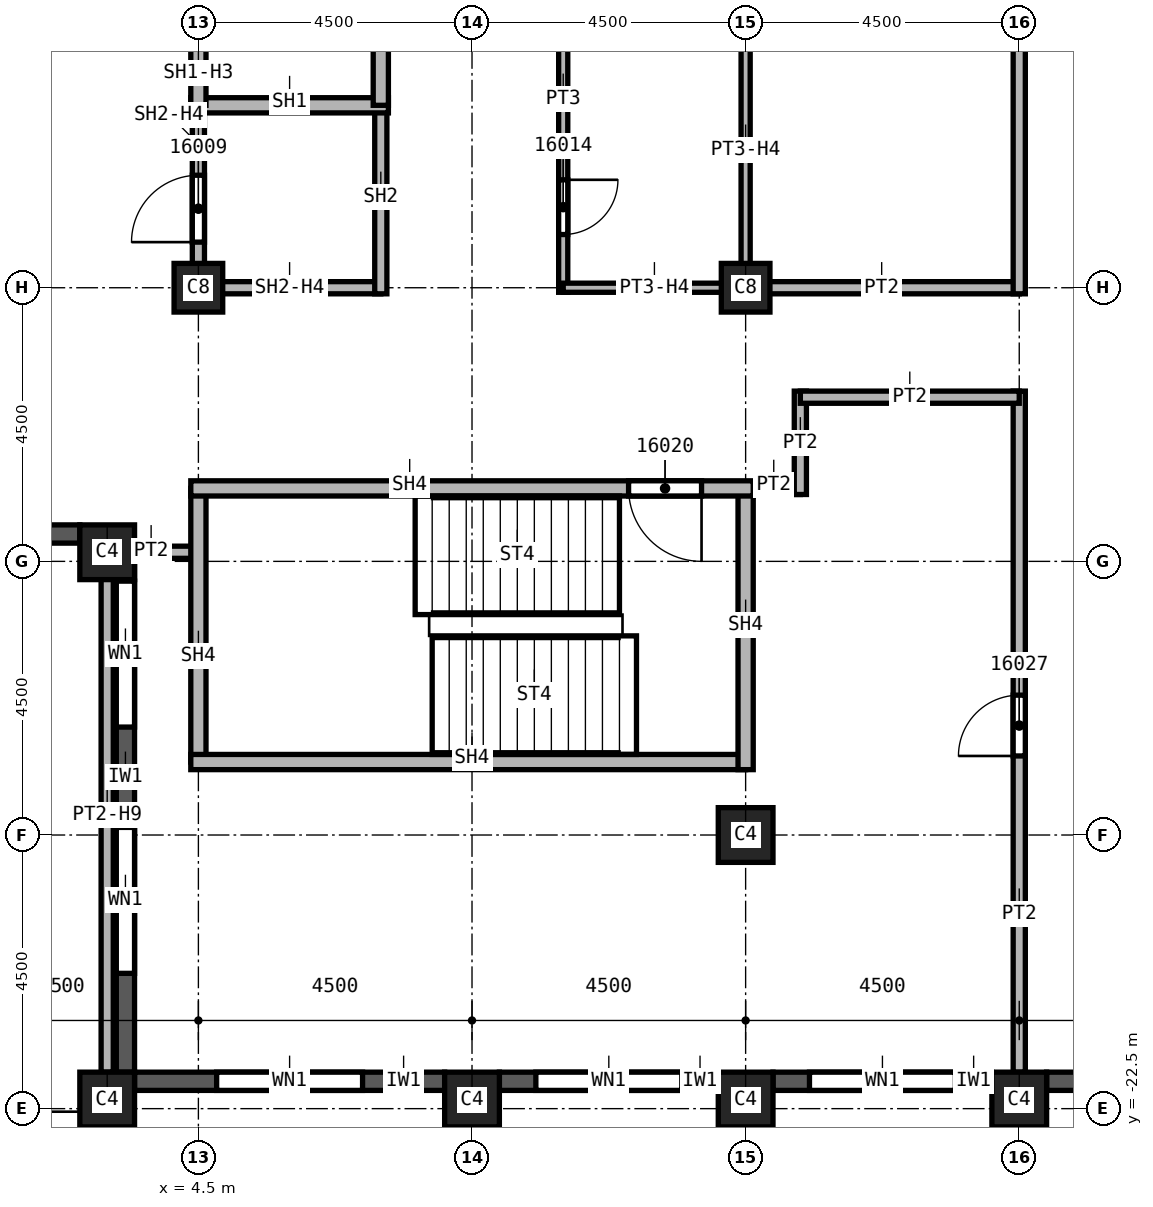
"""IFC4 building model, lengths in metres.
Left out: names, types, materials, properties, quantities, classifications, styles, units other than length and angle.
Written with IfcOpenShell. Run it as: python <this file> out.ifc"""

import sys

from ifc_helpers import new_model, si_unit, direction, frame, frame_2d, origin, origin_2d, place, context, subcontext, project, spatial, rectangle, extrude, element, fill, save


model = new_model("IFC4")
c1 = context("Model", 3, precision=1e-05, world=origin(), true_north=direction((0.0, 1.0)))
c2 = subcontext(c1, "Body", "Model", "MODEL_VIEW")
j1 = project(units=[si_unit("LENGTHUNIT", "METRE"), si_unit("PLANEANGLEUNIT", "RADIAN")], contexts=[c1])
p1 = place(None, origin())
s1 = spatial("IfcSite", under=j1, at=p1, CompositionType="ELEMENT")
p2 = place(p1, origin())
s2 = spatial("IfcBuilding", under=s1, at=p2, CompositionType="ELEMENT")
p3 = place(p2, frame((0.0, 0.0, 242.0)))
s3 = spatial("IfcBuildingStorey", under=s2, at=p3, CompositionType="ELEMENT", Elevation=242.0)
p4 = place(p3, frame((13.5, -18.0, 0.0), z_axis=(0.0, 0.0, 1.0), x_axis=(1.0, 0.0, 0.0)))
e1 = element("IfcColumn", 1, at=p4, inside=s3, PredefinedType="COLUMN", context=c2, shape_type="SweptSolid", body=[
    extrude(rectangle(XDim=0.9, YDim=0.9, at=origin_2d()), origin(), (0.0, 0.0, 1.0), 3.72),
])
for number, where, z_axis, x_axis in (
    (2, (4.5, -9.0, 0.0), (0.0, 0.0, 1.0), (1.0, 0.0, 0.0)),
    (3, (13.5, -9.0, 0.0), (0.0, 0.0, 1.0), (1.0, 0.0, 0.0)),
):
    element("IfcColumn", number, at=place(p3, frame(where, z_axis=z_axis, x_axis=x_axis)), inside=s3, PredefinedType="COLUMN", context=c2, shape_type="SweptSolid", body=[
        extrude(rectangle(XDim=0.8, YDim=0.8, at=origin_2d()), origin(), (0.0, 0.0, 1.0), 3.72),
    ])
for number, where, z_axis, x_axis in (
    (4, (3.0, -22.35, 0.0), (0.0, 0.0, 1.0), (1.0, 0.0, 0.0)),
    (5, (9.0, -22.35, 0.0), (0.0, 0.0, 1.0), (1.0, 0.0, 0.0)),
    (6, (13.5, -22.35, 0.0), (0.0, 0.0, 1.0), (1.0, 0.0, 0.0)),
    (7, (18.0, -22.35, 0.0), (0.0, 0.0, 1.0), (1.0, 0.0, 0.0)),
    (8, (3.0, -13.35, 0.0), (0.0, 0.0, 1.0), (1.0, 0.0, 0.0)),
):
    element("IfcColumn", number, at=place(p3, frame(where, z_axis=z_axis, x_axis=x_axis)), inside=s3, PredefinedType="COLUMN", context=c2, shape_type="SweptSolid", body=[
        extrude(rectangle(XDim=0.9, YDim=0.9, at=origin_2d()), origin(), (0.0, 0.0, 1.0), 3.72),
    ])
p5 = place(p3, frame((2.55, -13.05, 0.0), z_axis=(0.0, 0.0, 1.0), x_axis=(-1.0, 0.0, 0.0)))
e9 = element("IfcWall", 9, at=p5, inside=s3, PredefinedType="SOLIDWALL", context=c2, shape_type="SweptSolid", body=[
    extrude(rectangle(XDim=5.1, YDim=0.3, at=frame_2d((2.55, 0.0))), origin(), (0.0, 0.0, 1.0), 3.12),
])
p6 = place(p5, frame((1.95, 0.0, 0.0)))
e10 = element("IfcOpeningElement", 10, at=p6, cuts=e9, PredefinedType="OPENING", context=c2, shape_type="SweptSolid", body=[
    extrude(rectangle(XDim=1.2, YDim=2.4, at=frame_2d((0.6, 1.2))), frame((0.0, 0.15, 0.0), z_axis=(0.0, -1.0, 0.0), x_axis=(1.0, 0.0, 0.0)), (0.0, 0.0, 1.0), 0.3),
])
p7 = place(p3, frame((3.3, -13.4, 0.0), z_axis=(0.0, 0.0, 1.0), x_axis=(0.0, -1.0, 0.0)))
e11 = element("IfcWall", 11, at=p7, inside=s3, PredefinedType="SOLIDWALL", context=c2, shape_type="SweptSolid", body=[
    extrude(rectangle(XDim=8.5, YDim=0.3, at=frame_2d((4.25, 0.0))), origin(), (0.0, 0.0, 1.0), 3.12),
])
p8 = place(p7, frame((0.425, 0.0, 0.8)))
e12 = element("IfcOpeningElement", 12, at=p8, cuts=e11, PredefinedType="OPENING", context=c2, shape_type="SweptSolid", body=[
    extrude(rectangle(XDim=2.4, YDim=1.95, at=frame_2d((1.2, 0.975))), frame((0.0, 0.15, 0.0), z_axis=(0.0, -1.0, 0.0), x_axis=(1.0, 0.0, 0.0)), (0.0, 0.0, 1.0), 0.3),
])
p9 = place(p7, frame((4.475, 0.0, 0.8)))
e13 = element("IfcOpeningElement", 13, at=p9, cuts=e11, PredefinedType="OPENING", context=c2, shape_type="SweptSolid", body=[
    extrude(rectangle(XDim=2.4, YDim=1.95, at=frame_2d((1.2, 0.975))), frame((0.0, 0.15, 0.0), z_axis=(0.0, -1.0, 0.0), x_axis=(1.0, 0.0, 0.0)), (0.0, 0.0, 1.0), 0.3),
])
p10 = place(p3, frame((3.45, -22.05, 0.0), z_axis=(0.0, 0.0, 1.0), x_axis=(1.0, 0.0, 0.0)))
e14 = element("IfcWall", 14, at=p10, inside=s3, PredefinedType="SOLIDWALL", context=c2, shape_type="SweptSolid", body=[
    extrude(rectangle(XDim=5.1, YDim=0.3, at=frame_2d((2.55, 0.0))), origin(), (0.0, 0.0, 1.0), 3.12),
])
p11 = place(p10, frame((1.35, 0.0, 0.8)))
e15 = element("IfcOpeningElement", 15, at=p11, cuts=e14, PredefinedType="OPENING", context=c2, shape_type="SweptSolid", body=[
    extrude(rectangle(XDim=2.4, YDim=1.95, at=frame_2d((1.2, 0.975))), frame((0.0, 0.15, 0.0), z_axis=(0.0, -1.0, 0.0), x_axis=(1.0, 0.0, 0.0)), (0.0, 0.0, 1.0), 0.3),
])
p12 = place(p3, frame((9.45, -22.05, 0.0), z_axis=(0.0, 0.0, 1.0), x_axis=(1.0, 0.0, 0.0)))
e16 = element("IfcWall", 16, at=p12, inside=s3, PredefinedType="SOLIDWALL", context=c2, shape_type="SweptSolid", body=[
    extrude(rectangle(XDim=3.6, YDim=0.3, at=frame_2d((1.8, 0.0))), origin(), (0.0, 0.0, 1.0), 3.12),
])
p13 = place(p12, frame((0.6, 0.0, 0.8)))
e17 = element("IfcOpeningElement", 17, at=p13, cuts=e16, PredefinedType="OPENING", context=c2, shape_type="SweptSolid", body=[
    extrude(rectangle(XDim=2.4, YDim=1.95, at=frame_2d((1.2, 0.975))), frame((0.0, 0.15, 0.0), z_axis=(0.0, -1.0, 0.0), x_axis=(1.0, 0.0, 0.0)), (0.0, 0.0, 1.0), 0.3),
])
p14 = place(p3, frame((13.95, -22.05, 0.0), z_axis=(0.0, 0.0, 1.0), x_axis=(1.0, 0.0, 0.0)))
e18 = element("IfcWall", 18, at=p14, inside=s3, PredefinedType="SOLIDWALL", context=c2, shape_type="SweptSolid", body=[
    extrude(rectangle(XDim=3.6, YDim=0.3, at=frame_2d((1.8, 0.0))), origin(), (0.0, 0.0, 1.0), 3.12),
])
p15 = place(p14, frame((0.6, 0.0, 0.8)))
e19 = element("IfcOpeningElement", 19, at=p15, cuts=e18, PredefinedType="OPENING", context=c2, shape_type="SweptSolid", body=[
    extrude(rectangle(XDim=2.4, YDim=1.95, at=frame_2d((1.2, 0.975))), frame((0.0, 0.15, 0.0), z_axis=(0.0, -1.0, 0.0), x_axis=(1.0, 0.0, 0.0)), (0.0, 0.0, 1.0), 0.3),
])
p16 = place(p3, frame((18.45, -22.05, 0.0), z_axis=(0.0, 0.0, 1.0), x_axis=(1.0, 0.0, 0.0)))
e20 = element("IfcWall", 20, at=p16, inside=s3, PredefinedType="SOLIDWALL", context=c2, shape_type="SweptSolid", body=[
    extrude(rectangle(XDim=3.6, YDim=0.3, at=frame_2d((1.8, 0.0))), origin(), (0.0, 0.0, 1.0), 3.12),
])
p17 = place(p16, frame((0.625, 0.0, 0.8)))
e21 = element("IfcOpeningElement", 21, at=p17, cuts=e20, PredefinedType="OPENING", context=c2, shape_type="SweptSolid", body=[
    extrude(rectangle(XDim=0.6, YDim=1.95, at=frame_2d((0.3, 0.975))), frame((0.0, 0.15, 0.0), z_axis=(0.0, -1.0, 0.0), x_axis=(1.0, 0.0, 0.0)), (0.0, 0.0, 1.0), 0.3),
])
p18 = place(p16, frame((1.825, 0.0, 0.8)))
e22 = element("IfcOpeningElement", 22, at=p18, cuts=e20, PredefinedType="OPENING", context=c2, shape_type="SweptSolid", body=[
    extrude(rectangle(XDim=1.0, YDim=1.95, at=frame_2d((0.5, 0.975))), frame((0.0, 0.15, 0.0), z_axis=(0.0, -1.0, 0.0), x_axis=(1.0, 0.0, 0.0)), (0.0, 0.0, 1.0), 0.3),
])
p19 = place(p3, frame((3.0, -13.42, 0.0), z_axis=(0.0, 0.0, 1.0), x_axis=(0.0, -1.0, 0.0)))
e23 = element("IfcWall", 23, at=p19, inside=s3, PredefinedType="PARTITIONING", context=c2, shape_type="SweptSolid", body=[
    extrude(rectangle(XDim=8.479, YDim=0.2, at=frame_2d((4.24, 0.0))), origin(), (0.0, 0.0, 1.0), 2.874),
])
p20 = place(p3, frame((4.5, -13.35, 0.0), z_axis=(0.0, 0.0, 1.0), x_axis=(-1.0, 0.0, 0.0)))
e24 = element("IfcWall", 24, at=p20, inside=s3, PredefinedType="PARTITIONING", context=c2, shape_type="SweptSolid", body=[
    extrude(rectangle(XDim=1.429, YDim=0.2, at=frame_2d((0.715, 0.0))), origin(), (0.0, 0.0, 1.0), 3.72),
])
p21 = place(p3, frame((13.5, -9.0, 0.0), z_axis=(0.0, 0.0, 1.0), x_axis=(1.0, 0.0, 0.0)))
e25 = element("IfcWall", 25, at=p21, inside=s3, PredefinedType="PARTITIONING", context=c2, shape_type="SweptSolid", body=[
    extrude(rectangle(XDim=4.5, YDim=0.2, at=frame_2d((2.25, 0.0))), origin(), (0.0, 0.0, 1.0), 3.72),
])
p22 = place(p3, frame((14.4, -12.3, 0.0), z_axis=(0.0, 0.0, 1.0), x_axis=(-1.0, 0.0, 0.0)))
e26 = element("IfcWall", 26, at=p22, inside=s3, PredefinedType="PARTITIONING", context=c2, shape_type="SweptSolid", body=[
    extrude(rectangle(XDim=1.025, YDim=0.2, at=frame_2d((0.512, 0.0))), origin(), (0.0, 0.0, 1.0), 3.72),
])
p23 = place(p3, frame((14.4, -10.7, 0.0), z_axis=(0.0, 0.0, 1.0), x_axis=(0.0, -1.0, 0.0)))
e27 = element("IfcWall", 27, at=p23, inside=s3, PredefinedType="PARTITIONING", context=c2, shape_type="SweptSolid", body=[
    extrude(rectangle(XDim=1.7, YDim=0.2, at=frame_2d((0.85, 0.0))), origin(), (0.0, 0.0, 1.0), 3.72),
])
p24 = place(p3, frame((18.0, -21.9, 0.0), z_axis=(0.0, 0.0, 1.0), x_axis=(0.0, 1.0, 0.0)))
e28 = element("IfcWall", 28, at=p24, inside=s3, PredefinedType="PARTITIONING", context=c2, shape_type="SweptSolid", body=[
    extrude(rectangle(XDim=11.2, YDim=0.2, at=frame_2d((5.6, 0.0))), origin(), (0.0, 0.0, 1.0), 3.72),
])
p25 = place(p24, frame((5.2, 0.0, 0.0)))
e29 = element("IfcOpeningElement", 29, at=p25, cuts=e28, PredefinedType="OPENING", context=c2, shape_type="SweptSolid", body=[
    extrude(rectangle(XDim=1.0, YDim=2.1, at=frame_2d((0.5, 1.05))), frame((0.0, 0.1, 0.0), z_axis=(0.0, -1.0, 0.0), x_axis=(1.0, 0.0, 0.0)), (0.0, 0.0, 1.0), 0.2),
])
p26 = place(p3, frame((18.0, -10.8, 0.0), z_axis=(0.0, 0.0, 1.0), x_axis=(-1.0, 0.0, 0.0)))
e30 = element("IfcWall", 30, at=p26, inside=s3, PredefinedType="PARTITIONING", context=c2, shape_type="SweptSolid", body=[
    extrude(rectangle(XDim=3.6, YDim=0.2, at=frame_2d((1.8, 0.0))), origin(), (0.0, 0.0, 1.0), 3.72),
])
p27 = place(p3, frame((18.0, -9.1, 0.0), z_axis=(0.0, 0.0, 1.0), x_axis=(0.0, 1.0, 0.0)))
e31 = element("IfcWall", 31, at=p27, inside=s3, PredefinedType="PARTITIONING", context=c2, shape_type="SweptSolid", body=[
    extrude(rectangle(XDim=18.2, YDim=0.2, at=frame_2d((9.1, 0.0))), origin(), (0.0, 0.0, 1.0), 3.72),
])
p28 = place(p27, frame((4.6, 0.0, 0.0)))
e32 = element("IfcOpeningElement", 32, at=p28, cuts=e31, PredefinedType="OPENING", context=c2, shape_type="SweptSolid", body=[
    extrude(rectangle(XDim=1.0, YDim=2.1, at=frame_2d((0.5, 1.05))), frame((0.0, 0.1, 0.0), z_axis=(0.0, -1.0, 0.0), x_axis=(1.0, 0.0, 0.0)), (0.0, 0.0, 1.0), 0.2),
])
p29 = place(p27, frame((13.75, 0.0, 0.0)))
e33 = element("IfcOpeningElement", 33, at=p29, cuts=e31, PredefinedType="OPENING", context=c2, shape_type="SweptSolid", body=[
    extrude(rectangle(XDim=1.0, YDim=2.1, at=frame_2d((0.5, 1.05))), frame((0.0, 0.1, 0.0), z_axis=(0.0, -1.0, 0.0), x_axis=(1.0, 0.0, 0.0)), (0.0, 0.0, 1.0), 0.2),
])
p30 = place(p3, frame((4.5, -9.1, 0.0), z_axis=(0.0, 0.0, 1.0), x_axis=(0.0, 1.0, 0.0)))
e34 = element("IfcWall", 34, at=p30, inside=s3, PredefinedType="SOLIDWALL", context=c2, shape_type="SweptSolid", body=[
    extrude(rectangle(XDim=3.1, YDim=0.2, at=frame_2d((1.55, 0.0))), origin(), (0.0, 0.0, 1.0), 3.042),
])
p31 = place(p30, frame((0.85, 0.0, 0.0)))
e35 = element("IfcOpeningElement", 35, at=p31, cuts=e34, PredefinedType="OPENING", context=c2, shape_type="SweptSolid", body=[
    extrude(rectangle(XDim=1.1, YDim=2.1, at=frame_2d((0.55, 1.05))), frame((0.0, 0.1, 0.0), z_axis=(0.0, -1.0, 0.0), x_axis=(1.0, 0.0, 0.0)), (0.0, 0.0, 1.0), 0.2),
])
p32 = place(p3, frame((7.5, -9.0, 0.0), z_axis=(0.0, 0.0, 1.0), x_axis=(-1.0, 0.0, 0.0)))
e36 = element("IfcWall", 36, at=p32, inside=s3, PredefinedType="SOLIDWALL", context=c2, shape_type="SweptSolid", body=[
    extrude(rectangle(XDim=3.0, YDim=0.2, at=frame_2d((1.5, 0.0))), origin(), (0.0, 0.0, 1.0), 3.042),
])
p33 = place(p3, frame((7.5, -6.0, 0.0), z_axis=(0.0, 0.0, 1.0), x_axis=(0.0, -1.0, 0.0)))
e37 = element("IfcWall", 37, at=p33, inside=s3, PredefinedType="SOLIDWALL", context=c2, shape_type="SweptSolid", body=[
    extrude(rectangle(XDim=3.1, YDim=0.2, at=frame_2d((1.55, 0.0))), origin(), (0.0, 0.0, 1.0), 3.72),
])
p34 = place(p3, frame((4.375, -6.0, 0.0), z_axis=(0.0, 0.0, 1.0), x_axis=(1.0, 0.0, 0.0)))
e38 = element("IfcWall", 38, at=p34, inside=s3, PredefinedType="SOLIDWALL", context=c2, shape_type="SweptSolid", body=[
    extrude(rectangle(XDim=3.25, YDim=0.25, at=frame_2d((1.625, 0.0))), origin(), (0.0, 0.0, 1.0), 3.72),
])
p35 = place(p3, frame((4.5, -6.0, 0.0), z_axis=(0.0, 0.0, 1.0), x_axis=(0.0, 1.0, 0.0)))
e39 = element("IfcWall", 39, at=p35, inside=s3, PredefinedType="SOLIDWALL", context=c2, shape_type="SweptSolid", body=[
    extrude(rectangle(XDim=6.0, YDim=0.25, at=frame_2d((3.0, 0.0))), origin(), (0.0, 0.0, 1.0), 3.042),
])
p36 = place(p35, frame((0.95, 0.0, 0.0)))
e40 = element("IfcOpeningElement", 40, at=p36, cuts=e39, PredefinedType="OPENING", context=c2, shape_type="SweptSolid", body=[
    extrude(rectangle(XDim=1.1, YDim=2.1, at=frame_2d((0.55, 1.05))), frame((0.0, 0.125, 0.0), z_axis=(0.0, -1.0, 0.0), x_axis=(1.0, 0.0, 0.0)), (0.0, 0.0, 1.0), 0.25),
])
p37 = place(p35, frame((3.95, 0.0, 0.0)))
e41 = element("IfcOpeningElement", 41, at=p37, cuts=e39, PredefinedType="OPENING", context=c2, shape_type="SweptSolid", body=[
    extrude(rectangle(XDim=1.1, YDim=2.1, at=frame_2d((0.55, 1.05))), frame((0.0, 0.125, 0.0), z_axis=(0.0, -1.0, 0.0), x_axis=(1.0, 0.0, 0.0)), (0.0, 0.0, 1.0), 0.25),
])
p38 = place(p3, frame((7.5, 3.125, 0.0), z_axis=(0.0, 0.0, 1.0), x_axis=(0.0, -1.0, 0.0)))
e42 = element("IfcWall", 42, at=p38, inside=s3, PredefinedType="SOLIDWALL", context=c2, shape_type="SweptSolid", body=[
    extrude(rectangle(XDim=9.125, YDim=0.25, at=frame_2d((4.562, 0.0))), origin(), (0.0, 0.0, 1.0), 3.72),
])
p39 = place(p3, frame((4.5, -16.8, 0.0), z_axis=(0.0, 0.0, 1.0), x_axis=(0.0, 1.0, 0.0)))
e43 = element("IfcWall", 43, at=p39, inside=s3, PredefinedType="SOLIDWALL", context=c2, shape_type="SweptSolid", body=[
    extrude(rectangle(XDim=4.5, YDim=0.25, at=frame_2d((2.25, 0.0))), origin(), (0.0, 0.0, 1.0), 3.72),
])
p40 = place(p3, frame((13.5, -16.8, 0.0), z_axis=(0.0, 0.0, 1.0), x_axis=(-1.0, 0.0, 0.0)))
e44 = element("IfcWall", 44, at=p40, inside=s3, PredefinedType="SOLIDWALL", context=c2, shape_type="SweptSolid", body=[
    extrude(rectangle(XDim=9.125, YDim=0.25, at=frame_2d((4.562, 0.0))), origin(), (0.0, 0.0, 1.0), 3.72),
])
p41 = place(p3, frame((13.5, -12.3, 0.0), z_axis=(0.0, 0.0, 1.0), x_axis=(0.0, -1.0, 0.0)))
e45 = element("IfcWall", 45, at=p41, inside=s3, PredefinedType="SOLIDWALL", context=c2, shape_type="SweptSolid", body=[
    extrude(rectangle(XDim=4.625, YDim=0.25, at=frame_2d((2.312, 0.0))), origin(), (0.0, 0.0, 1.0), 3.72),
])
p42 = place(p3, frame((13.625, -12.3, 0.0), z_axis=(0.0, 0.0, 1.0), x_axis=(-1.0, 0.0, 0.0)))
e46 = element("IfcWall", 46, at=p42, inside=s3, PredefinedType="SOLIDWALL", context=c2, shape_type="SweptSolid", body=[
    extrude(rectangle(XDim=9.25, YDim=0.25, at=frame_2d((4.625, 0.0))), origin(), (0.0, 0.0, 1.0), 3.72),
])
p43 = place(p42, frame((0.85, 0.0, 0.0)))
e47 = element("IfcOpeningElement", 47, at=p43, cuts=e46, PredefinedType="OPENING", context=c2, shape_type="SweptSolid", body=[
    extrude(rectangle(XDim=1.2, YDim=2.1, at=frame_2d((0.6, 1.05))), frame((0.0, 0.125, 0.0), z_axis=(0.0, -1.0, 0.0), x_axis=(1.0, 0.0, 0.0)), (0.0, 0.0, 1.0), 0.25),
])
p44 = place(p3, frame((10.5, -4.425, 0.0), z_axis=(0.0, 0.0, 1.0), x_axis=(0.0, -1.0, 0.0)))
e48 = element("IfcWall", 48, at=p44, inside=s3, PredefinedType="PARTITIONING", context=c2, shape_type="SweptSolid", body=[
    extrude(rectangle(XDim=4.65, YDim=0.15, at=frame_2d((2.325, 0.0))), origin(), (0.0, 0.0, 1.0), 3.72),
])
p45 = place(p44, frame((2.8, 0.0, 0.0)))
e49 = element("IfcOpeningElement", 49, at=p45, cuts=e48, PredefinedType="OPENING", context=c2, shape_type="SweptSolid", body=[
    extrude(rectangle(XDim=0.9, YDim=2.1, at=frame_2d((0.45, 1.05))), frame((0.0, 0.075, 0.0), z_axis=(0.0, -1.0, 0.0), x_axis=(1.0, 0.0, 0.0)), (0.0, 0.0, 1.0), 0.15),
])
p46 = place(p3, frame((13.5, -4.5, 0.0), z_axis=(0.0, 0.0, 1.0), x_axis=(0.0, -1.0, 0.0)))
e50 = element("IfcWall", 50, at=p46, inside=s3, PredefinedType="PARTITIONING", context=c2, shape_type="SweptSolid", body=[
    extrude(rectangle(XDim=4.6, YDim=0.15, at=frame_2d((2.3, 0.0))), origin(), (0.0, 0.0, 1.0), 3.042),
])
p47 = place(p3, frame((13.575, -9.0, 0.0), z_axis=(0.0, 0.0, 1.0), x_axis=(-1.0, 0.0, 0.0)))
e51 = element("IfcWall", 51, at=p47, inside=s3, PredefinedType="PARTITIONING", context=c2, shape_type="SweptSolid", body=[
    extrude(rectangle(XDim=3.075, YDim=0.15, at=frame_2d((1.538, 0.0))), origin(), (0.0, 0.0, 1.0), 3.042),
])
p48 = place(p8, origin())
e52 = element("IfcWindow", 52, at=p48, inside=s3, PartitioningType="SINGLE_PANEL", PredefinedType="WINDOW", context=c2, shape_type="SweptSolid", body=[
    extrude(rectangle(XDim=2.4, YDim=1.95, at=frame_2d((1.2, 0.975))), frame((0.0, 0.03, 0.0), z_axis=(0.0, -1.0, 0.0), x_axis=(1.0, 0.0, 0.0)), (0.0, 0.0, 1.0), 0.06),
])
fill(e12, e52)
p49 = place(p9, origin())
e53 = element("IfcWindow", 53, at=p49, inside=s3, PartitioningType="SINGLE_PANEL", PredefinedType="WINDOW", context=c2, shape_type="SweptSolid", body=[
    extrude(rectangle(XDim=2.4, YDim=1.95, at=frame_2d((1.2, 0.975))), frame((0.0, 0.03, 0.0), z_axis=(0.0, -1.0, 0.0), x_axis=(1.0, 0.0, 0.0)), (0.0, 0.0, 1.0), 0.06),
])
fill(e13, e53)
p50 = place(p11, origin())
e54 = element("IfcWindow", 54, at=p50, inside=s3, PartitioningType="SINGLE_PANEL", PredefinedType="WINDOW", context=c2, shape_type="SweptSolid", body=[
    extrude(rectangle(XDim=2.4, YDim=1.95, at=frame_2d((1.2, 0.975))), frame((0.0, 0.03, 0.0), z_axis=(0.0, -1.0, 0.0), x_axis=(1.0, 0.0, 0.0)), (0.0, 0.0, 1.0), 0.06),
])
fill(e15, e54)
p51 = place(p13, origin())
e55 = element("IfcWindow", 55, at=p51, inside=s3, PartitioningType="SINGLE_PANEL", PredefinedType="WINDOW", context=c2, shape_type="SweptSolid", body=[
    extrude(rectangle(XDim=2.4, YDim=1.95, at=frame_2d((1.2, 0.975))), frame((0.0, 0.03, 0.0), z_axis=(0.0, -1.0, 0.0), x_axis=(1.0, 0.0, 0.0)), (0.0, 0.0, 1.0), 0.06),
])
fill(e17, e55)
p52 = place(p15, origin())
e56 = element("IfcWindow", 56, at=p52, inside=s3, PartitioningType="SINGLE_PANEL", PredefinedType="WINDOW", context=c2, shape_type="SweptSolid", body=[
    extrude(rectangle(XDim=2.4, YDim=1.95, at=frame_2d((1.2, 0.975))), frame((0.0, 0.03, 0.0), z_axis=(0.0, -1.0, 0.0), x_axis=(1.0, 0.0, 0.0)), (0.0, 0.0, 1.0), 0.06),
])
fill(e19, e56)
p53 = place(p31, origin())
e57 = element("IfcDoor", 57, at=p53, inside=s3, OperationType="SINGLE_SWING_RIGHT", PredefinedType="DOOR", context=c2, shape_type="SweptSolid", body=[
    extrude(rectangle(XDim=1.1, YDim=2.1, at=frame_2d((0.55, 1.05))), frame((0.0, 0.025, 0.0), z_axis=(0.0, -1.0, 0.0), x_axis=(1.0, 0.0, 0.0)), (0.0, 0.0, 1.0), 0.05),
])
fill(e35, e57)
p54 = place(p45, origin())
e58 = element("IfcDoor", 58, at=p54, inside=s3, OperationType="SINGLE_SWING_LEFT", PredefinedType="DOOR", context=c2, shape_type="SweptSolid", body=[
    extrude(rectangle(XDim=0.9, YDim=2.1, at=frame_2d((0.45, 1.05))), frame((0.0, 0.025, 0.0), z_axis=(0.0, -1.0, 0.0), x_axis=(1.0, 0.0, 0.0)), (0.0, 0.0, 1.0), 0.05),
])
fill(e49, e58)
p55 = place(p43, origin())
e59 = element("IfcDoor", 59, at=p55, inside=s3, OperationType="SINGLE_SWING_LEFT", PredefinedType="DOOR", context=c2, shape_type="SweptSolid", body=[
    extrude(rectangle(XDim=1.2, YDim=2.1, at=frame_2d((0.6, 1.05))), frame((0.0, 0.025, 0.0), z_axis=(0.0, -1.0, 0.0), x_axis=(1.0, 0.0, 0.0)), (0.0, 0.0, 1.0), 0.05),
])
fill(e47, e59)
p56 = place(p25, origin())
e60 = element("IfcDoor", 60, at=p56, inside=s3, OperationType="SINGLE_SWING_RIGHT", PredefinedType="DOOR", context=c2, shape_type="SweptSolid", body=[
    extrude(rectangle(XDim=1.0, YDim=2.1, at=frame_2d((0.5, 1.05))), frame((0.0, 0.025, 0.0), z_axis=(0.0, -1.0, 0.0), x_axis=(1.0, 0.0, 0.0)), (0.0, 0.0, 1.0), 0.05),
])
fill(e29, e60)
save(model, sys.argv[1])
